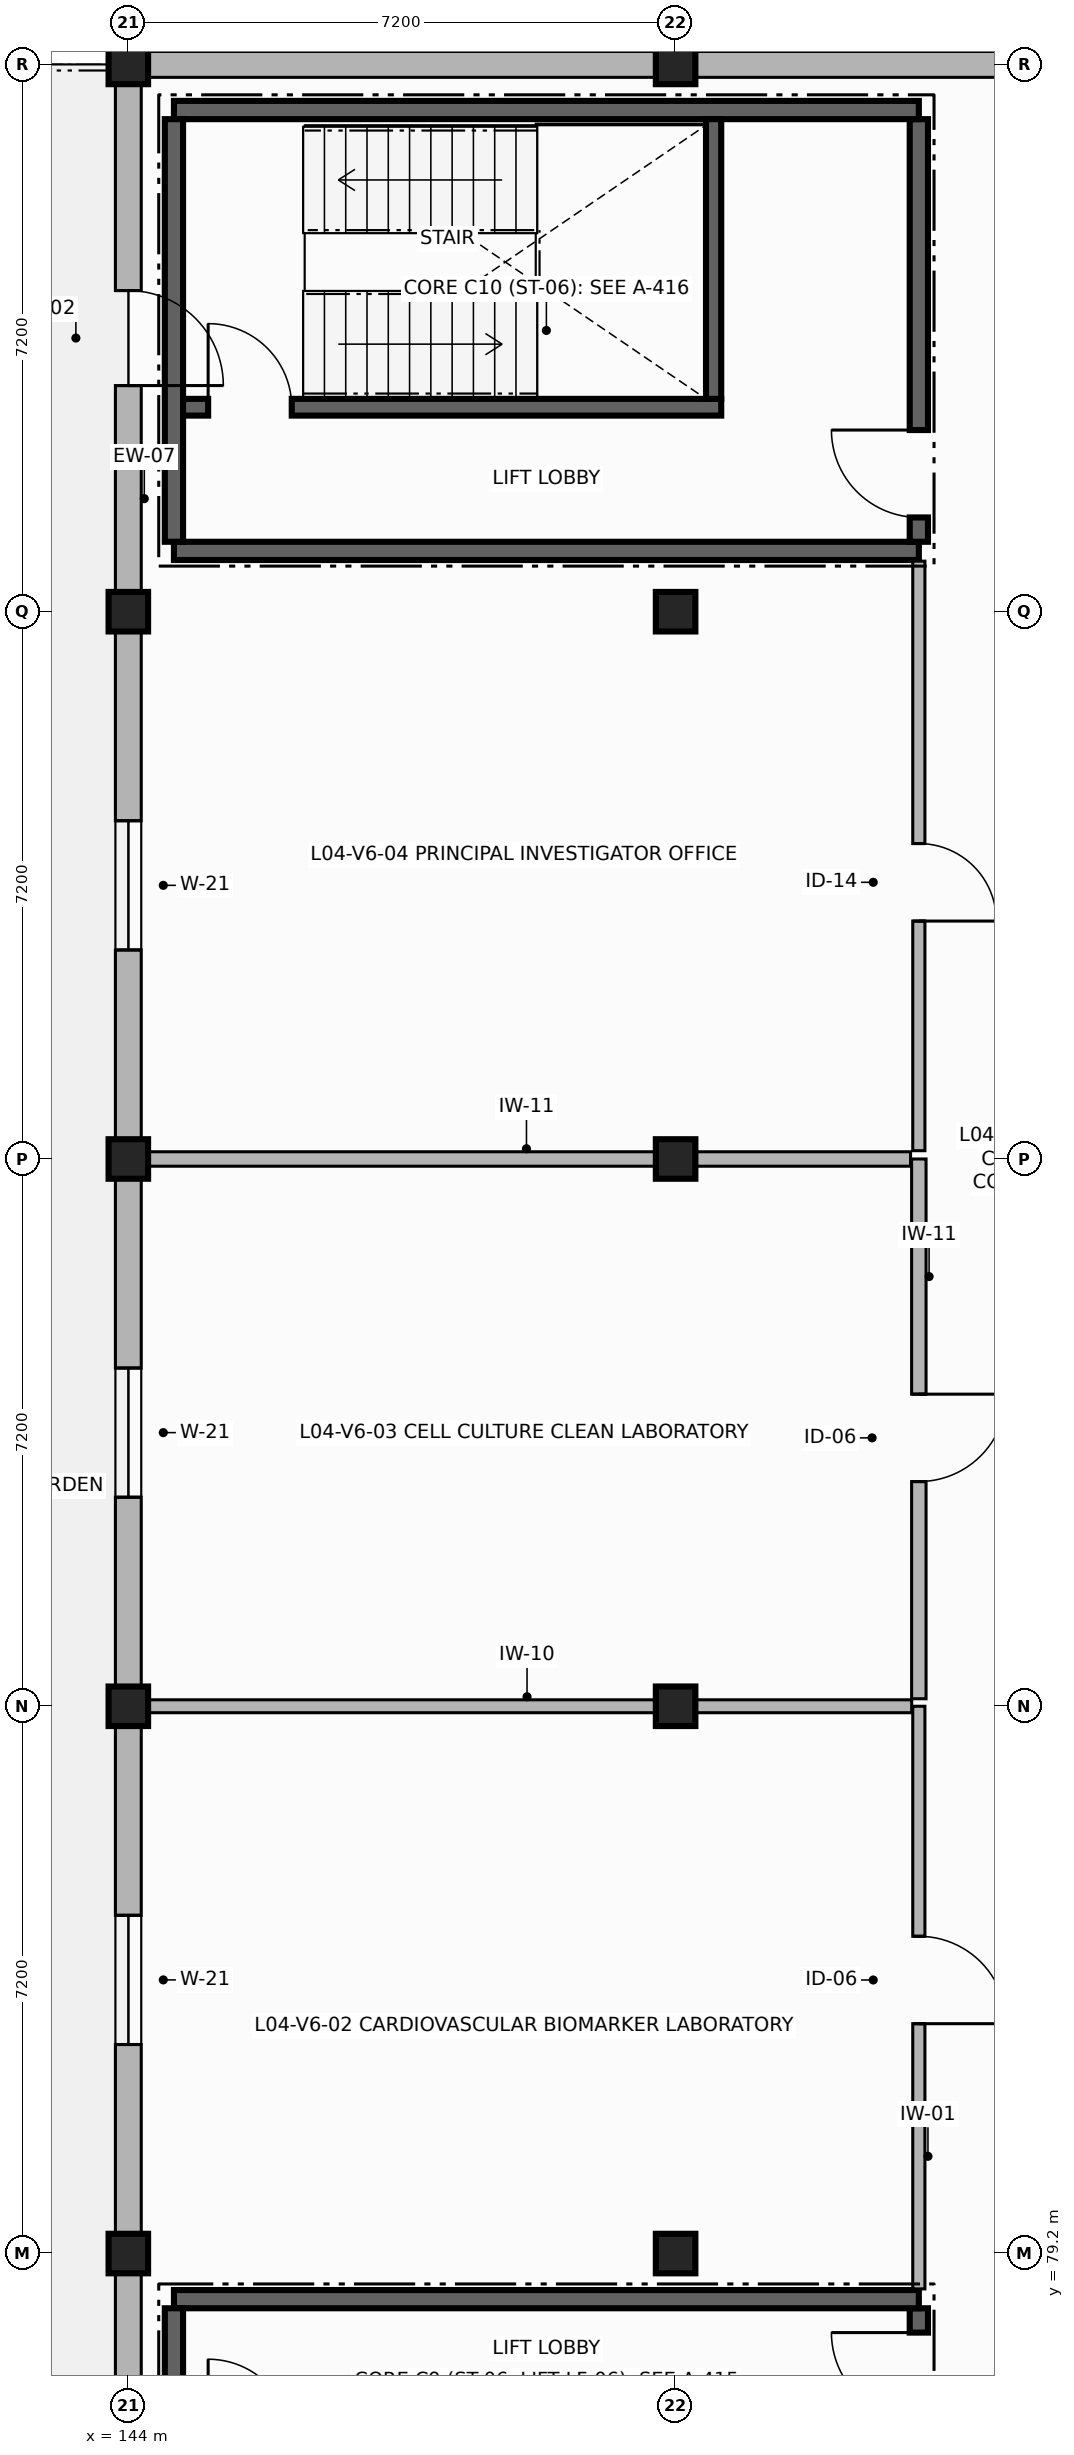
"""IFC4 building model, lengths in metres.
Left out: names, types, materials, properties, quantities, classifications, styles, units other than length and angle.
Written with IfcOpenShell. Run it as: python <this file> out.ifc"""

import sys

from ifc_helpers import new_model, si_unit, direction, frame, frame_2d, origin, origin_2d, place, context, subcontext, project, spatial, rectangle, extrude, element, fill, save


model = new_model("IFC4")
c1 = context("Model", 3, precision=1e-05, world=origin(), true_north=direction((0.0, 1.0)))
c2 = subcontext(c1, "Body", "Model", "MODEL_VIEW")
j1 = project(units=[si_unit("LENGTHUNIT", "METRE"), si_unit("PLANEANGLEUNIT", "RADIAN")], contexts=[c1])
p1 = place(None, origin())
s1 = spatial("IfcSite", under=j1, at=p1, CompositionType="ELEMENT")
p2 = place(p1, origin())
s2 = spatial("IfcBuilding", under=s1, at=p2, CompositionType="ELEMENT")
p3 = place(p2, frame((0.0, 0.0, 16.0)))
s3 = spatial("IfcBuildingStorey", under=s2, at=p3, CompositionType="ELEMENT", Elevation=16.0)
for number, where, z_axis, x_axis in (
    (1, (144.0, 79.2, 0.0), (0.0, 0.0, 1.0), (1.0, 0.0, 0.0)),
    (2, (144.0, 86.4, 0.0), (0.0, 0.0, 1.0), (1.0, 0.0, 0.0)),
    (3, (144.0, 93.6, 0.0), (0.0, 0.0, 1.0), (1.0, 0.0, 0.0)),
    (4, (144.0, 100.8, 0.0), (0.0, 0.0, 1.0), (1.0, 0.0, 0.0)),
    (5, (144.0, 108.0, 0.0), (0.0, 0.0, 1.0), (1.0, 0.0, 0.0)),
    (6, (151.2, 79.2, 0.0), (0.0, 0.0, 1.0), (1.0, 0.0, 0.0)),
    (7, (151.2, 86.4, 0.0), (0.0, 0.0, 1.0), (1.0, 0.0, 0.0)),
    (8, (151.2, 93.6, 0.0), (0.0, 0.0, 1.0), (1.0, 0.0, 0.0)),
    (9, (151.2, 100.8, 0.0), (0.0, 0.0, 1.0), (1.0, 0.0, 0.0)),
    (10, (151.2, 108.0, 0.0), (0.0, 0.0, 1.0), (1.0, 0.0, 0.0)),
):
    element("IfcColumn", number, at=place(p3, frame(where, z_axis=z_axis, x_axis=x_axis)), inside=s3, PredefinedType="COLUMN", context=c2, shape_type="SweptSolid", body=[
        extrude(rectangle(XDim=0.52, YDim=0.52, at=origin_2d()), origin(), (0.0, 0.0, 1.0), 3.38),
    ])
for number, where, z_axis, x_axis in (
    (11, (158.4, 108.0, 0.0), (0.0, 0.0, 1.0), (-1.0, 0.0, 0.0)),
    (12, (151.2, 108.0, 0.0), (0.0, 0.0, 1.0), (-1.0, 0.0, 0.0)),
):
    element("IfcWall", number, at=place(p3, frame(where, z_axis=z_axis, x_axis=x_axis)), inside=s3, PredefinedType="SOLIDWALL", context=c2, shape_type="SweptSolid", body=[
        extrude(rectangle(XDim=7.2, YDim=0.34, at=frame_2d((3.6, 0.0))), origin(), (0.0, 0.0, 1.0), 2.71),
    ])
p4 = place(p3, frame((144.0, 108.0, 0.0), z_axis=(0.0, 0.0, 1.0), x_axis=(0.0, -1.0, 0.0)))
e13 = element("IfcWall", 13, at=p4, inside=s3, PredefinedType="SOLIDWALL", context=c2, shape_type="SweptSolid", body=[
    extrude(rectangle(XDim=7.2, YDim=0.34, at=frame_2d((3.6, 0.0))), origin(), (0.0, 0.0, 1.0), 2.71),
])
p5 = place(p4, frame((2.975, 0.0, 0.0)))
e14 = element("IfcOpeningElement", 14, at=p5, cuts=e13, PredefinedType="OPENING", context=c2, shape_type="SweptSolid", body=[
    extrude(rectangle(XDim=1.25, YDim=2.25, at=frame_2d((0.625, 1.125))), frame((0.0, 0.18, 0.0), z_axis=(0.0, -1.0, 0.0), x_axis=(1.0, 0.0, 0.0)), (0.0, 0.0, 1.0), 0.36),
])
p6 = place(p3, frame((144.0, 100.8, 0.0), z_axis=(0.0, 0.0, 1.0), x_axis=(0.0, -1.0, 0.0)))
e15 = element("IfcWall", 15, at=p6, inside=s3, PredefinedType="SOLIDWALL", context=c2, shape_type="SweptSolid", body=[
    extrude(rectangle(XDim=7.2, YDim=0.34, at=frame_2d((3.6, 0.0))), origin(), (0.0, 0.0, 1.0), 2.71),
])
p7 = place(p6, frame((2.75, 0.0, 0.85)))
e16 = element("IfcOpeningElement", 16, at=p7, cuts=e15, PredefinedType="OPENING", context=c2, shape_type="SweptSolid", body=[
    extrude(rectangle(XDim=1.7, YDim=1.65, at=frame_2d((0.85, 0.825))), frame((0.0, 0.18, 0.0), z_axis=(0.0, -1.0, 0.0), x_axis=(1.0, 0.0, 0.0)), (0.0, 0.0, 1.0), 0.36),
])
p8 = place(p3, frame((144.0, 93.6, 0.0), z_axis=(0.0, 0.0, 1.0), x_axis=(0.0, -1.0, 0.0)))
e17 = element("IfcWall", 17, at=p8, inside=s3, PredefinedType="SOLIDWALL", context=c2, shape_type="SweptSolid", body=[
    extrude(rectangle(XDim=7.2, YDim=0.34, at=frame_2d((3.6, 0.0))), origin(), (0.0, 0.0, 1.0), 2.71),
])
p9 = place(p8, frame((2.75, 0.0, 0.85)))
e18 = element("IfcOpeningElement", 18, at=p9, cuts=e17, PredefinedType="OPENING", context=c2, shape_type="SweptSolid", body=[
    extrude(rectangle(XDim=1.7, YDim=1.65, at=frame_2d((0.85, 0.825))), frame((0.0, 0.18, 0.0), z_axis=(0.0, -1.0, 0.0), x_axis=(1.0, 0.0, 0.0)), (0.0, 0.0, 1.0), 0.36),
])
p10 = place(p3, frame((144.0, 86.4, 0.0), z_axis=(0.0, 0.0, 1.0), x_axis=(0.0, -1.0, 0.0)))
e19 = element("IfcWall", 19, at=p10, inside=s3, PredefinedType="SOLIDWALL", context=c2, shape_type="SweptSolid", body=[
    extrude(rectangle(XDim=7.2, YDim=0.34, at=frame_2d((3.6, 0.0))), origin(), (0.0, 0.0, 1.0), 2.71),
])
p11 = place(p10, frame((2.75, 0.0, 0.85)))
e20 = element("IfcOpeningElement", 20, at=p11, cuts=e19, PredefinedType="OPENING", context=c2, shape_type="SweptSolid", body=[
    extrude(rectangle(XDim=1.7, YDim=1.65, at=frame_2d((0.85, 0.825))), frame((0.0, 0.18, 0.0), z_axis=(0.0, -1.0, 0.0), x_axis=(1.0, 0.0, 0.0)), (0.0, 0.0, 1.0), 0.36),
])
p12 = place(p3, frame((144.0, 79.2, 0.0), z_axis=(0.0, 0.0, 1.0), x_axis=(0.0, -1.0, 0.0)))
e21 = element("IfcWall", 21, at=p12, inside=s3, PredefinedType="SOLIDWALL", context=c2, shape_type="SweptSolid", body=[
    extrude(rectangle(XDim=7.2, YDim=0.34, at=frame_2d((3.6, 0.0))), origin(), (0.0, 0.0, 1.0), 2.71),
])
p13 = place(p3, frame((154.4, 72.92, 0.0), z_axis=(0.0, 0.0, 1.0), x_axis=(0.0, 1.0, 0.0)))
e22 = element("IfcWall", 22, at=p13, inside=s3, PredefinedType="SHEAR", context=c2, shape_type="SweptSolid", body=[
    extrude(rectangle(XDim=5.56, YDim=0.24, at=frame_2d((2.78, 0.0))), origin(), (0.0, 0.0, 1.0), 3.38),
])
p14 = place(p13, frame((4.09, 0.0, 0.0)))
e23 = element("IfcOpeningElement", 23, at=p14, cuts=e22, PredefinedType="OPENING", context=c2, shape_type="SweptSolid", body=[
    extrude(rectangle(XDim=1.15, YDim=2.2, at=frame_2d((0.575, 1.1))), frame((0.0, 0.13, 0.0), z_axis=(0.0, -1.0, 0.0), x_axis=(1.0, 0.0, 0.0)), (0.0, 0.0, 1.0), 0.26),
])
p15 = place(p3, frame((154.4, 78.6, 0.0), z_axis=(0.0, 0.0, 1.0), x_axis=(-1.0, 0.0, 0.0)))
e24 = element("IfcWall", 24, at=p15, inside=s3, PredefinedType="SHEAR", context=c2, shape_type="SweptSolid", body=[
    extrude(rectangle(XDim=9.8, YDim=0.24, at=frame_2d((4.9, 0.0))), origin(), (0.0, 0.0, 1.0), 3.38),
])
p16 = place(p3, frame((144.6, 78.48, 0.0), z_axis=(0.0, 0.0, 1.0), x_axis=(0.0, -1.0, 0.0)))
e25 = element("IfcWall", 25, at=p16, inside=s3, PredefinedType="SHEAR", context=c2, shape_type="SweptSolid", body=[
    extrude(rectangle(XDim=5.56, YDim=0.24, at=frame_2d((2.78, 0.0))), origin(), (0.0, 0.0, 1.0), 3.38),
])
p17 = place(p3, frame((144.6, 101.6, 0.0), z_axis=(0.0, 0.0, 1.0), x_axis=(1.0, 0.0, 0.0)))
e26 = element("IfcWall", 26, at=p17, inside=s3, PredefinedType="SHEAR", context=c2, shape_type="SweptSolid", body=[
    extrude(rectangle(XDim=9.8, YDim=0.24, at=frame_2d((4.9, 0.0))), origin(), (0.0, 0.0, 1.0), 3.38),
])
p18 = place(p3, frame((154.4, 101.72, 0.0), z_axis=(0.0, 0.0, 1.0), x_axis=(0.0, 1.0, 0.0)))
e27 = element("IfcWall", 27, at=p18, inside=s3, PredefinedType="SHEAR", context=c2, shape_type="SweptSolid", body=[
    extrude(rectangle(XDim=5.56, YDim=0.24, at=frame_2d((2.78, 0.0))), origin(), (0.0, 0.0, 1.0), 3.38),
])
p19 = place(p18, frame((0.32, 0.0, 0.0)))
e28 = element("IfcOpeningElement", 28, at=p19, cuts=e27, PredefinedType="OPENING", context=c2, shape_type="SweptSolid", body=[
    extrude(rectangle(XDim=1.15, YDim=2.2, at=frame_2d((0.575, 1.1))), frame((0.0, 0.13, 0.0), z_axis=(0.0, -1.0, 0.0), x_axis=(1.0, 0.0, 0.0)), (0.0, 0.0, 1.0), 0.26),
])
p20 = place(p3, frame((154.4, 107.4, 0.0), z_axis=(0.0, 0.0, 1.0), x_axis=(-1.0, 0.0, 0.0)))
e29 = element("IfcWall", 29, at=p20, inside=s3, PredefinedType="SHEAR", context=c2, shape_type="SweptSolid", body=[
    extrude(rectangle(XDim=9.8, YDim=0.24, at=frame_2d((4.9, 0.0))), origin(), (0.0, 0.0, 1.0), 3.38),
])
p21 = place(p3, frame((144.6, 107.28, 0.0), z_axis=(0.0, 0.0, 1.0), x_axis=(0.0, -1.0, 0.0)))
e30 = element("IfcWall", 30, at=p21, inside=s3, PredefinedType="SHEAR", context=c2, shape_type="SweptSolid", body=[
    extrude(rectangle(XDim=5.56, YDim=0.24, at=frame_2d((2.78, 0.0))), origin(), (0.0, 0.0, 1.0), 3.38),
])
p22 = place(p3, frame((144.72, 103.49, 0.0), z_axis=(0.0, 0.0, 1.0), x_axis=(1.0, 0.0, 0.0)))
e31 = element("IfcWall", 31, at=p22, inside=s3, PredefinedType="SHEAR", context=c2, shape_type="SweptSolid", body=[
    extrude(rectangle(XDim=7.08, YDim=0.22, at=frame_2d((3.54, 0.0))), origin(), (0.0, 0.0, 1.0), 3.38),
])
p23 = place(p22, frame((0.33, 0.0, 0.0)))
e32 = element("IfcOpeningElement", 32, at=p23, cuts=e31, PredefinedType="OPENING", context=c2, shape_type="SweptSolid", body=[
    extrude(rectangle(XDim=1.1, YDim=2.15, at=frame_2d((0.55, 1.075))), frame((0.0, 0.12, 0.0), z_axis=(0.0, -1.0, 0.0), x_axis=(1.0, 0.0, 0.0)), (0.0, 0.0, 1.0), 0.24),
])
p24 = place(p3, frame((151.7, 103.6, 0.0), z_axis=(0.0, 0.0, 1.0), x_axis=(0.0, 1.0, 0.0)))
e33 = element("IfcWall", 33, at=p24, inside=s3, PredefinedType="SHEAR", context=c2, shape_type="SweptSolid", body=[
    extrude(rectangle(XDim=3.68, YDim=0.2, at=frame_2d((1.84, 0.0))), origin(), (0.0, 0.0, 1.0), 3.38),
])
p25 = place(p3, frame((154.4, 86.4, 0.0), z_axis=(0.0, 0.0, 1.0), x_axis=(0.0, -1.0, 0.0)))
e34 = element("IfcWall", 34, at=p25, inside=s3, PredefinedType="PARTITIONING", context=c2, shape_type="SweptSolid", body=[
    extrude(rectangle(XDim=7.665, YDim=0.16, at=frame_2d((3.833, 0.0))), origin(), (0.0, 0.0, 1.0), 2.69),
])
p26 = place(p25, frame((3.026, 0.0, 0.0)))
e35 = element("IfcOpeningElement", 35, at=p26, cuts=e34, PredefinedType="OPENING", context=c2, shape_type="SweptSolid", body=[
    extrude(rectangle(XDim=1.15, YDim=2.25, at=frame_2d((0.575, 1.125))), frame((0.0, 0.09, 0.0), z_axis=(0.0, -1.0, 0.0), x_axis=(1.0, 0.0, 0.0)), (0.0, 0.0, 1.0), 0.18),
])
p27 = place(p3, frame((144.185, 86.4, 0.0), z_axis=(0.0, 0.0, 1.0), x_axis=(1.0, 0.0, 0.0)))
e36 = element("IfcWall", 36, at=p27, inside=s3, PredefinedType="PARTITIONING", context=c2, shape_type="SweptSolid", body=[
    extrude(rectangle(XDim=10.121, YDim=0.17, at=frame_2d((5.061, 0.0))), origin(), (0.0, 0.0, 1.0), 2.69),
])
p28 = place(p3, frame((154.4, 93.6, 0.0), z_axis=(0.0, 0.0, 1.0), x_axis=(0.0, -1.0, 0.0)))
e37 = element("IfcWall", 37, at=p28, inside=s3, PredefinedType="PARTITIONING", context=c2, shape_type="SweptSolid", body=[
    extrude(rectangle(XDim=7.101, YDim=0.19, at=frame_2d((3.551, 0.0))), origin(), (0.0, 0.0, 1.0), 2.69),
])
p29 = place(p28, frame((3.094, 0.0, 0.0)))
e38 = element("IfcOpeningElement", 38, at=p29, cuts=e37, PredefinedType="OPENING", context=c2, shape_type="SweptSolid", body=[
    extrude(rectangle(XDim=1.15, YDim=2.25, at=frame_2d((0.575, 1.125))), frame((0.0, 0.105, 0.0), z_axis=(0.0, -1.0, 0.0), x_axis=(1.0, 0.0, 0.0)), (0.0, 0.0, 1.0), 0.21),
])
p30 = place(p3, frame((144.185, 93.6, 0.0), z_axis=(0.0, 0.0, 1.0), x_axis=(1.0, 0.0, 0.0)))
e39 = element("IfcWall", 39, at=p30, inside=s3, PredefinedType="PARTITIONING", context=c2, shape_type="SweptSolid", body=[
    extrude(rectangle(XDim=10.106, YDim=0.19, at=frame_2d((5.053, 0.0))), origin(), (0.0, 0.0, 1.0), 2.69),
])
p31 = place(p3, frame((154.4, 101.465, 0.0), z_axis=(0.0, 0.0, 1.0), x_axis=(0.0, -1.0, 0.0)))
e40 = element("IfcWall", 40, at=p31, inside=s3, PredefinedType="PARTITIONING", context=c2, shape_type="SweptSolid", body=[
    extrude(rectangle(XDim=7.756, YDim=0.16, at=frame_2d((3.878, 0.0))), origin(), (0.0, 0.0, 1.0), 2.69),
])
p32 = place(p31, frame((3.715, 0.0, 0.0)))
e41 = element("IfcOpeningElement", 41, at=p32, cuts=e40, PredefinedType="OPENING", context=c2, shape_type="SweptSolid", body=[
    extrude(rectangle(XDim=1.02, YDim=2.15, at=frame_2d((0.51, 1.075))), frame((0.0, 0.09, 0.0), z_axis=(0.0, -1.0, 0.0), x_axis=(1.0, 0.0, 0.0)), (0.0, 0.0, 1.0), 0.18),
])
p33 = place(p5, origin())
e42 = element("IfcDoor", 42, at=p33, inside=s3, OperationType="SINGLE_SWING_RIGHT", PredefinedType="DOOR", context=c2, shape_type="SweptSolid", body=[
    extrude(rectangle(XDim=1.25, YDim=2.25, at=frame_2d((0.625, 1.125))), frame((0.0, 0.025, 0.0), z_axis=(0.0, -1.0, 0.0), x_axis=(1.0, 0.0, 0.0)), (0.0, 0.0, 1.0), 0.05),
])
fill(e14, e42)
p34 = place(p7, origin())
e43 = element("IfcWindow", 43, at=p34, inside=s3, PartitioningType="SINGLE_PANEL", PredefinedType="WINDOW", context=c2, shape_type="SweptSolid", body=[
    extrude(rectangle(XDim=1.7, YDim=1.65, at=frame_2d((0.85, 0.825))), frame((0.0, 0.03, 0.0), z_axis=(0.0, -1.0, 0.0), x_axis=(1.0, 0.0, 0.0)), (0.0, 0.0, 1.0), 0.06),
])
fill(e16, e43)
p35 = place(p9, origin())
e44 = element("IfcWindow", 44, at=p35, inside=s3, PartitioningType="SINGLE_PANEL", PredefinedType="WINDOW", context=c2, shape_type="SweptSolid", body=[
    extrude(rectangle(XDim=1.7, YDim=1.65, at=frame_2d((0.85, 0.825))), frame((0.0, 0.03, 0.0), z_axis=(0.0, -1.0, 0.0), x_axis=(1.0, 0.0, 0.0)), (0.0, 0.0, 1.0), 0.06),
])
fill(e18, e44)
p36 = place(p11, origin())
e45 = element("IfcWindow", 45, at=p36, inside=s3, PartitioningType="SINGLE_PANEL", PredefinedType="WINDOW", context=c2, shape_type="SweptSolid", body=[
    extrude(rectangle(XDim=1.7, YDim=1.65, at=frame_2d((0.85, 0.825))), frame((0.0, 0.03, 0.0), z_axis=(0.0, -1.0, 0.0), x_axis=(1.0, 0.0, 0.0)), (0.0, 0.0, 1.0), 0.06),
])
fill(e20, e45)
p37 = place(p14, origin())
e46 = element("IfcDoor", 46, at=p37, inside=s3, OperationType="SINGLE_SWING_RIGHT", PredefinedType="DOOR", context=c2, shape_type="SweptSolid", body=[
    extrude(rectangle(XDim=1.15, YDim=2.2, at=frame_2d((0.575, 1.1))), frame((0.0, 0.025, 0.0), z_axis=(0.0, -1.0, 0.0), x_axis=(1.0, 0.0, 0.0)), (0.0, 0.0, 1.0), 0.05),
])
fill(e23, e46)
p38 = place(p23, origin())
e47 = element("IfcDoor", 47, at=p38, inside=s3, OperationType="SINGLE_SWING_LEFT", PredefinedType="DOOR", context=c2, shape_type="SweptSolid", body=[
    extrude(rectangle(XDim=1.1, YDim=2.15, at=frame_2d((0.55, 1.075))), frame((0.0, 0.025, 0.0), z_axis=(0.0, -1.0, 0.0), x_axis=(1.0, 0.0, 0.0)), (0.0, 0.0, 1.0), 0.05),
])
fill(e32, e47)
p39 = place(p19, origin())
e48 = element("IfcDoor", 48, at=p39, inside=s3, OperationType="SINGLE_SWING_RIGHT", PredefinedType="DOOR", context=c2, shape_type="SweptSolid", body=[
    extrude(rectangle(XDim=1.15, YDim=2.2, at=frame_2d((0.575, 1.1))), frame((0.0, 0.025, 0.0), z_axis=(0.0, -1.0, 0.0), x_axis=(1.0, 0.0, 0.0)), (0.0, 0.0, 1.0), 0.05),
])
fill(e28, e48)
p40 = place(p26, origin())
e49 = element("IfcDoor", 49, at=p40, inside=s3, OperationType="SINGLE_SWING_RIGHT", PredefinedType="DOOR", context=c2, shape_type="SweptSolid", body=[
    extrude(rectangle(XDim=1.15, YDim=2.25, at=frame_2d((0.575, 1.125))), frame((0.0, 0.025, 0.0), z_axis=(0.0, -1.0, 0.0), x_axis=(1.0, 0.0, 0.0)), (0.0, 0.0, 1.0), 0.05),
])
fill(e35, e49)
p41 = place(p29, origin())
e50 = element("IfcDoor", 50, at=p41, inside=s3, OperationType="SINGLE_SWING_LEFT", PredefinedType="DOOR", context=c2, shape_type="SweptSolid", body=[
    extrude(rectangle(XDim=1.15, YDim=2.25, at=frame_2d((0.575, 1.125))), frame((0.0, 0.025, 0.0), z_axis=(0.0, -1.0, 0.0), x_axis=(1.0, 0.0, 0.0)), (0.0, 0.0, 1.0), 0.05),
])
fill(e38, e50)
p42 = place(p32, origin())
e51 = element("IfcDoor", 51, at=p42, inside=s3, OperationType="SINGLE_SWING_RIGHT", PredefinedType="DOOR", context=c2, shape_type="SweptSolid", body=[
    extrude(rectangle(XDim=1.02, YDim=2.15, at=frame_2d((0.51, 1.075))), frame((0.0, 0.025, 0.0), z_axis=(0.0, -1.0, 0.0), x_axis=(1.0, 0.0, 0.0)), (0.0, 0.0, 1.0), 0.05),
])
fill(e41, e51)
save(model, sys.argv[1])
